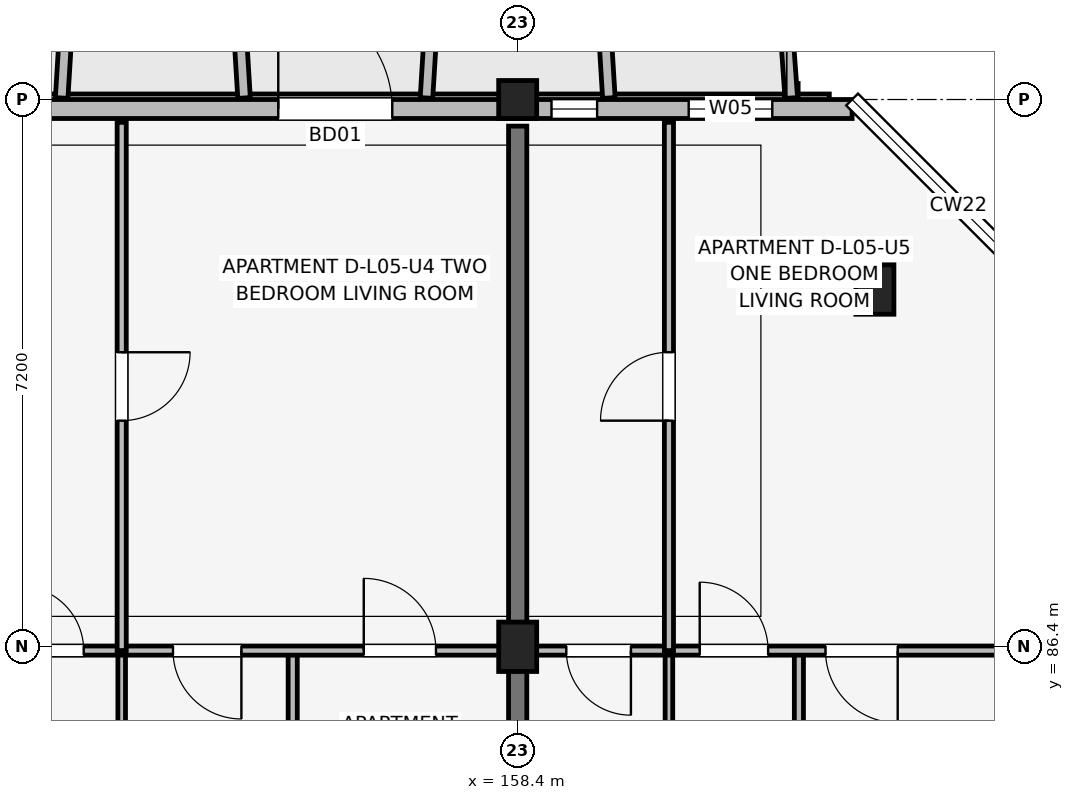
"""IFC4 building model, lengths in metres.
Left out: names, types, materials, properties, quantities, classifications, styles, units other than length and angle.
Written with IfcOpenShell. Run it as: python <this file> out.ifc"""

import sys

from ifc_helpers import new_model, si_unit, direction, frame, frame_2d, origin, origin_2d, place, context, subcontext, project, spatial, rectangle, extrude, element, fill, save


model = new_model("IFC4")
c1 = context("Model", 3, precision=1e-05, world=origin(), true_north=direction((0.0, 1.0)))
c2 = subcontext(c1, "Body", "Model", "MODEL_VIEW")
j1 = project(units=[si_unit("LENGTHUNIT", "METRE"), si_unit("PLANEANGLEUNIT", "RADIAN")], contexts=[c1])
p1 = place(None, origin())
s1 = spatial("IfcSite", under=j1, at=p1, CompositionType="ELEMENT")
p2 = place(p1, origin())
s2 = spatial("IfcBuilding", under=s1, at=p2, CompositionType="ELEMENT")
p3 = place(p2, frame((0.0, 0.0, 18.15)))
s3 = spatial("IfcBuildingStorey", under=s2, at=p3, CompositionType="ELEMENT", Elevation=18.15)
p4 = place(p3, frame((158.4, 86.4, 0.0), z_axis=(0.0, 0.0, 1.0), x_axis=(1.0, 0.0, 0.0)))
e1 = element("IfcColumn", 1, at=p4, inside=s3, PredefinedType="COLUMN", context=c2, shape_type="SweptSolid", body=[
    extrude(rectangle(XDim=0.5, YDim=0.65, at=origin_2d()), origin(), (0.0, 0.0, 1.0), 3.15),
])
p5 = place(p3, frame((158.4, 93.6, 0.0), z_axis=(0.0, 0.0, 1.0), x_axis=(1.0, 0.0, 0.0)))
e2 = element("IfcColumn", 2, at=p5, inside=s3, PredefinedType="COLUMN", context=c2, shape_type="SweptSolid", body=[
    extrude(rectangle(XDim=0.5, YDim=0.5, at=origin_2d()), origin(), (0.0, 0.0, 1.0), 3.15),
])
p6 = place(p3, frame((163.1, 91.1, 0.0), z_axis=(0.0, 0.0, 1.0), x_axis=(1.0, 0.0, 0.0)))
e3 = element("IfcColumn", 3, at=p6, inside=s3, PredefinedType="COLUMN", context=c2, shape_type="SweptSolid", body=[
    extrude(rectangle(XDim=0.5, YDim=0.65, at=origin_2d()), origin(), (0.0, 0.0, 1.0), 3.15),
])
p7 = place(p3, frame((158.4, 83.85, 0.0), z_axis=(0.0, 0.0, 1.0), x_axis=(0.0, 1.0, 0.0)))
e4 = element("IfcWall", 4, at=p7, inside=s3, PredefinedType="SHEAR", context=c2, shape_type="SweptSolid", body=[
    extrude(rectangle(XDim=9.4, YDim=0.24, at=frame_2d((4.7, 0.0))), origin(), (0.0, 0.0, 1.0), 3.15),
])
p8 = place(p3, frame((162.8, 93.475, 0.0), z_axis=(0.0, 0.0, 1.0), x_axis=(-1.0, 0.0, 0.0)))
e5 = element("IfcWall", 5, at=p8, inside=s3, PredefinedType="SOLIDWALL", context=c2, shape_type="SweptSolid", body=[
    extrude(rectangle(XDim=30.4, YDim=0.25, at=frame_2d((15.2, 0.0))), origin(), (0.0, 0.0, 1.0), 2.43),
])
p9 = place(p8, frame((22.025, 0.0, 0.0), z_axis=(0.0, 0.0, 1.0), x_axis=(-1.0, 0.0, 0.0)))
e6 = element("IfcOpeningElement", 6, at=p9, cuts=e5, PredefinedType="OPENING", context=c2, shape_type="SweptSolid", body=[
    extrude(rectangle(XDim=1.65, YDim=2.15, at=frame_2d((0.825, 1.075))), frame((0.0, 0.135, 0.0), z_axis=(0.0, -1.0, 0.0), x_axis=(1.0, 0.0, 0.0)), (0.0, 0.0, 1.0), 0.27),
])
p10 = place(p8, frame((7.55, 0.0, 0.0), z_axis=(0.0, 0.0, 1.0), x_axis=(-1.0, 0.0, 0.0)))
e7 = element("IfcOpeningElement", 7, at=p10, cuts=e5, PredefinedType="OPENING", context=c2, shape_type="SweptSolid", body=[
    extrude(rectangle(XDim=1.5, YDim=2.15, at=frame_2d((0.75, 1.075))), frame((0.0, 0.135, 0.0), z_axis=(0.0, -1.0, 0.0), x_axis=(1.0, 0.0, 0.0)), (0.0, 0.0, 1.0), 0.27),
])
p11 = place(p8, frame((28.015, 0.0, 0.75)))
e8 = element("IfcOpeningElement", 8, at=p11, cuts=e5, PredefinedType="OPENING", context=c2, shape_type="SweptSolid", body=[
    extrude(rectangle(XDim=0.6, YDim=1.25, at=frame_2d((0.3, 0.625))), frame((0.0, 0.135, 0.0), z_axis=(0.0, -1.0, 0.0), x_axis=(1.0, 0.0, 0.0)), (0.0, 0.0, 1.0), 0.27),
])
p12 = place(p8, frame((15.47, 0.0, 0.7)))
e9 = element("IfcOpeningElement", 9, at=p12, cuts=e5, PredefinedType="OPENING", context=c2, shape_type="SweptSolid", body=[
    extrude(rectangle(XDim=1.86, YDim=1.6, at=frame_2d((0.93, 0.8))), frame((0.0, 0.135, 0.0), z_axis=(0.0, -1.0, 0.0), x_axis=(1.0, 0.0, 0.0)), (0.0, 0.0, 1.0), 0.27),
])
p13 = place(p8, frame((10.555, 0.0, 0.75)))
e10 = element("IfcOpeningElement", 10, at=p13, cuts=e5, PredefinedType="OPENING", context=c2, shape_type="SweptSolid", body=[
    extrude(rectangle(XDim=0.6, YDim=1.25, at=frame_2d((0.3, 0.625))), frame((0.0, 0.135, 0.0), z_axis=(0.0, -1.0, 0.0), x_axis=(1.0, 0.0, 0.0)), (0.0, 0.0, 1.0), 0.27),
])
p14 = place(p8, frame((3.355, 0.0, 0.75)))
e11 = element("IfcOpeningElement", 11, at=p14, cuts=e5, PredefinedType="OPENING", context=c2, shape_type="SweptSolid", body=[
    extrude(rectangle(XDim=0.6, YDim=1.25, at=frame_2d((0.3, 0.625))), frame((0.0, 0.135, 0.0), z_axis=(0.0, -1.0, 0.0), x_axis=(1.0, 0.0, 0.0)), (0.0, 0.0, 1.0), 0.27),
])
p15 = place(p8, frame((1.05, 0.0, 0.75)))
e12 = element("IfcOpeningElement", 12, at=p15, cuts=e5, PredefinedType="OPENING", context=c2, shape_type="SweptSolid", body=[
    extrude(rectangle(XDim=1.1, YDim=1.5, at=frame_2d((0.55, 0.75))), frame((0.0, 0.135, 0.0), z_axis=(0.0, -1.0, 0.0), x_axis=(1.0, 0.0, 0.0)), (0.0, 0.0, 1.0), 0.27),
])
for number, where, z_axis, x_axis in (
    (13, (152.4, 93.62, 0.0), (0.0, 0.0, 1.0), (0.061, 0.998, 0.0)),
    (14, (154.8, 93.62, 0.0), (0.0, 0.0, 1.0), (-0.061, 0.998, 0.0)),
    (15, (157.2, 93.62, 0.0), (0.0, 0.0, 1.0), (0.061, 0.998, 0.0)),
):
    element("IfcWall", number, at=place(p3, frame(where, z_axis=z_axis, x_axis=x_axis)), inside=s3, PredefinedType="ELEMENTEDWALL", context=c2, shape_type="SweptSolid", body=[
        extrude(rectangle(XDim=1.964, YDim=0.165, at=frame_2d((0.982, 0.0))), origin(), (0.0, 0.0, 1.0), 2.53),
    ])
p16 = place(p3, frame((159.6, 93.62, 0.0), z_axis=(0.0, 0.0, 1.0), x_axis=(-0.061170732449, 0.998127317276, 0.0)))
e16 = element("IfcWall", 16, at=p16, inside=s3, PredefinedType="ELEMENTEDWALL", context=c2, shape_type="SweptSolid", body=[
    extrude(rectangle(XDim=1.964, YDim=0.165, at=frame_2d((0.982, 0.0))), origin(), (0.0, 0.0, 1.0), 2.95),
])
p17 = place(p3, frame((162.0, 93.62, 0.0), z_axis=(0.0, 0.0, 1.0), x_axis=(-0.071194071069, 0.997462482625, 0.0)))
e17 = element("IfcWall", 17, at=p17, inside=s3, PredefinedType="ELEMENTEDWALL", context=c2, shape_type="SweptSolid", body=[
    extrude(rectangle(XDim=1.965, YDim=0.165, at=frame_2d((0.982, 0.0))), origin(), (0.0, 0.0, 1.0), 2.95),
])
p18 = place(p3, frame((153.19, 83.7, 0.0), z_axis=(0.0, 0.0, 1.0), x_axis=(0.0, 1.0, 0.0)))
e18 = element("IfcWall", 18, at=p18, inside=s3, PredefinedType="PARTITIONING", context=c2, shape_type="SweptSolid", body=[
    extrude(rectangle(XDim=2.65, YDim=0.1, at=frame_2d((1.325, 0.0))), origin(), (0.0, 0.0, 1.0), 2.375),
])
p19 = place(p3, frame((155.44, 83.7, 0.0), z_axis=(0.0, 0.0, 1.0), x_axis=(0.0, 1.0, 0.0)))
e19 = element("IfcWall", 19, at=p19, inside=s3, PredefinedType="PARTITIONING", context=c2, shape_type="SweptSolid", body=[
    extrude(rectangle(XDim=2.65, YDim=0.12, at=frame_2d((1.325, 0.0))), origin(), (0.0, 0.0, 1.0), 2.375),
])
p20 = place(p3, frame((151.34, 86.35, 0.0), z_axis=(0.0, 0.0, 1.0), x_axis=(1.0, 0.0, 0.0)))
e20 = element("IfcWall", 20, at=p20, inside=s3, PredefinedType="PARTITIONING", context=c2, shape_type="SweptSolid", body=[
    extrude(rectangle(XDim=6.92, YDim=0.12, at=frame_2d((3.46, 0.0))), origin(), (0.0, 0.0, 1.0), 2.375),
])
p21 = place(p20, frame((0.5, 0.0, 0.0)))
e21 = element("IfcOpeningElement", 21, at=p21, cuts=e20, PredefinedType="OPENING", context=c2, shape_type="SweptSolid", body=[
    extrude(rectangle(XDim=0.85, YDim=2.08, at=frame_2d((0.425, 1.04))), frame((0.0, 0.07, 0.0), z_axis=(0.0, -1.0, 0.0), x_axis=(1.0, 0.0, 0.0)), (0.0, 0.0, 1.0), 0.14),
])
p22 = place(p20, frame((3.425, 0.0, 0.0), z_axis=(0.0, 0.0, 1.0), x_axis=(-1.0, 0.0, 0.0)))
e22 = element("IfcOpeningElement", 22, at=p22, cuts=e20, PredefinedType="OPENING", context=c2, shape_type="SweptSolid", body=[
    extrude(rectangle(XDim=0.9, YDim=2.08, at=frame_2d((0.45, 1.04))), frame((0.0, 0.07, 0.0), z_axis=(0.0, -1.0, 0.0), x_axis=(1.0, 0.0, 0.0)), (0.0, 0.0, 1.0), 0.14),
])
p23 = place(p20, frame((5.035, 0.0, 0.0)))
e23 = element("IfcOpeningElement", 23, at=p23, cuts=e20, PredefinedType="OPENING", context=c2, shape_type="SweptSolid", body=[
    extrude(rectangle(XDim=0.95, YDim=2.08, at=frame_2d((0.475, 1.04))), frame((0.0, 0.07, 0.0), z_axis=(0.0, -1.0, 0.0), x_axis=(1.0, 0.0, 0.0)), (0.0, 0.0, 1.0), 0.14),
])
p24 = place(p3, frame((153.19, 86.35, 0.0), z_axis=(0.0, 0.0, 1.0), x_axis=(0.0, 1.0, 0.0)))
e24 = element("IfcWall", 24, at=p24, inside=s3, PredefinedType="PARTITIONING", context=c2, shape_type="SweptSolid", body=[
    extrude(rectangle(XDim=6.95, YDim=0.12, at=frame_2d((3.475, 0.0))), origin(), (0.0, 0.0, 1.0), 2.375),
])
p25 = place(p24, frame((3.925, 0.0, 0.0), z_axis=(0.0, 0.0, 1.0), x_axis=(-1.0, 0.0, 0.0)))
e25 = element("IfcOpeningElement", 25, at=p25, cuts=e24, PredefinedType="OPENING", context=c2, shape_type="SweptSolid", body=[
    extrude(rectangle(XDim=0.9, YDim=2.08, at=frame_2d((0.45, 1.04))), frame((0.0, 0.07, 0.0), z_axis=(0.0, -1.0, 0.0), x_axis=(1.0, 0.0, 0.0)), (0.0, 0.0, 1.0), 0.14),
])
p26 = place(p3, frame((160.39, 83.7, 0.0), z_axis=(0.0, 0.0, 1.0), x_axis=(0.0, 1.0, 0.0)))
e26 = element("IfcWall", 26, at=p26, inside=s3, PredefinedType="PARTITIONING", context=c2, shape_type="SweptSolid", body=[
    extrude(rectangle(XDim=2.65, YDim=0.1, at=frame_2d((1.325, 0.0))), origin(), (0.0, 0.0, 1.0), 2.375),
])
p27 = place(p3, frame((162.1, 83.7, 0.0), z_axis=(0.0, 0.0, 1.0), x_axis=(0.0, 1.0, 0.0)))
e27 = element("IfcWall", 27, at=p27, inside=s3, PredefinedType="PARTITIONING", context=c2, shape_type="SweptSolid", body=[
    extrude(rectangle(XDim=2.65, YDim=0.12, at=frame_2d((1.325, 0.0))), origin(), (0.0, 0.0, 1.0), 2.375),
])
p28 = place(p3, frame((158.54, 86.35, 0.0), z_axis=(0.0, 0.0, 1.0), x_axis=(1.0, 0.0, 0.0)))
e28 = element("IfcWall", 28, at=p28, inside=s3, PredefinedType="PARTITIONING", context=c2, shape_type="SweptSolid", body=[
    extrude(rectangle(XDim=6.92, YDim=0.12, at=frame_2d((3.46, 0.0))), origin(), (0.0, 0.0, 1.0), 2.375),
])
p29 = place(p28, frame((1.35, 0.0, 0.0), z_axis=(0.0, 0.0, 1.0), x_axis=(-1.0, 0.0, 0.0)))
e29 = element("IfcOpeningElement", 29, at=p29, cuts=e28, PredefinedType="OPENING", context=c2, shape_type="SweptSolid", body=[
    extrude(rectangle(XDim=0.85, YDim=2.08, at=frame_2d((0.425, 1.04))), frame((0.0, 0.07, 0.0), z_axis=(0.0, -1.0, 0.0), x_axis=(1.0, 0.0, 0.0)), (0.0, 0.0, 1.0), 0.14),
])
p30 = place(p28, frame((2.255, 0.0, 0.0)))
e30 = element("IfcOpeningElement", 30, at=p30, cuts=e28, PredefinedType="OPENING", context=c2, shape_type="SweptSolid", body=[
    extrude(rectangle(XDim=0.9, YDim=2.08, at=frame_2d((0.45, 1.04))), frame((0.0, 0.07, 0.0), z_axis=(0.0, -1.0, 0.0), x_axis=(1.0, 0.0, 0.0)), (0.0, 0.0, 1.0), 0.14),
])
p31 = place(p28, frame((4.86, 0.0, 0.0), z_axis=(0.0, 0.0, 1.0), x_axis=(-1.0, 0.0, 0.0)))
e31 = element("IfcOpeningElement", 31, at=p31, cuts=e28, PredefinedType="OPENING", context=c2, shape_type="SweptSolid", body=[
    extrude(rectangle(XDim=0.95, YDim=2.08, at=frame_2d((0.475, 1.04))), frame((0.0, 0.07, 0.0), z_axis=(0.0, -1.0, 0.0), x_axis=(1.0, 0.0, 0.0)), (0.0, 0.0, 1.0), 0.14),
])
p32 = place(p3, frame((160.39, 86.35, 0.0), z_axis=(0.0, 0.0, 1.0), x_axis=(0.0, 1.0, 0.0)))
e32 = element("IfcWall", 32, at=p32, inside=s3, PredefinedType="PARTITIONING", context=c2, shape_type="SweptSolid", body=[
    extrude(rectangle(XDim=6.95, YDim=0.12, at=frame_2d((3.475, 0.0))), origin(), (0.0, 0.0, 1.0), 2.375),
])
p33 = place(p32, frame((3.025, 0.0, 0.0)))
e33 = element("IfcOpeningElement", 33, at=p33, cuts=e32, PredefinedType="OPENING", context=c2, shape_type="SweptSolid", body=[
    extrude(rectangle(XDim=0.9, YDim=2.08, at=frame_2d((0.45, 1.04))), frame((0.0, 0.07, 0.0), z_axis=(0.0, -1.0, 0.0), x_axis=(1.0, 0.0, 0.0)), (0.0, 0.0, 1.0), 0.14),
])
p34 = place(p10, origin())
e34 = element("IfcDoor", 34, at=p34, inside=s3, OperationType="SINGLE_SWING_RIGHT", PredefinedType="DOOR", context=c2, shape_type="SweptSolid", body=[
    extrude(rectangle(XDim=1.5, YDim=2.15, at=frame_2d((0.75, 1.075))), frame((0.0, 0.025, 0.0), z_axis=(0.0, -1.0, 0.0), x_axis=(1.0, 0.0, 0.0)), (0.0, 0.0, 1.0), 0.05),
])
fill(e7, e34)
p35 = place(p14, origin())
e35 = element("IfcWindow", 35, at=p35, inside=s3, PartitioningType="SINGLE_PANEL", PredefinedType="WINDOW", context=c2, shape_type="SweptSolid", body=[
    extrude(rectangle(XDim=0.6, YDim=1.25, at=frame_2d((0.3, 0.625))), frame((0.0, 0.03, 0.0), z_axis=(0.0, -1.0, 0.0), x_axis=(1.0, 0.0, 0.0)), (0.0, 0.0, 1.0), 0.06),
])
fill(e11, e35)
p36 = place(p15, origin())
e36 = element("IfcWindow", 36, at=p36, inside=s3, PartitioningType="SINGLE_PANEL", PredefinedType="WINDOW", context=c2, shape_type="SweptSolid", body=[
    extrude(rectangle(XDim=1.1, YDim=1.5, at=frame_2d((0.55, 0.75))), frame((0.0, 0.03, 0.0), z_axis=(0.0, -1.0, 0.0), x_axis=(1.0, 0.0, 0.0)), (0.0, 0.0, 1.0), 0.06),
])
fill(e12, e36)
p37 = place(p21, origin())
e37 = element("IfcDoor", 37, at=p37, inside=s3, OperationType="SINGLE_SWING_LEFT", PredefinedType="DOOR", context=c2, shape_type="SweptSolid", body=[
    extrude(rectangle(XDim=0.85, YDim=2.08, at=frame_2d((0.425, 1.04))), frame((0.0, 0.025, 0.0), z_axis=(0.0, -1.0, 0.0), x_axis=(1.0, 0.0, 0.0)), (0.0, 0.0, 1.0), 0.05),
])
fill(e21, e37)
p38 = place(p22, origin())
e38 = element("IfcDoor", 38, at=p38, inside=s3, OperationType="SINGLE_SWING_RIGHT", PredefinedType="DOOR", context=c2, shape_type="SweptSolid", body=[
    extrude(rectangle(XDim=0.9, YDim=2.08, at=frame_2d((0.45, 1.04))), frame((0.0, 0.025, 0.0), z_axis=(0.0, -1.0, 0.0), x_axis=(1.0, 0.0, 0.0)), (0.0, 0.0, 1.0), 0.05),
])
fill(e22, e38)
p39 = place(p23, origin())
e39 = element("IfcDoor", 39, at=p39, inside=s3, OperationType="SINGLE_SWING_LEFT", PredefinedType="DOOR", context=c2, shape_type="SweptSolid", body=[
    extrude(rectangle(XDim=0.95, YDim=2.08, at=frame_2d((0.475, 1.04))), frame((0.0, 0.025, 0.0), z_axis=(0.0, -1.0, 0.0), x_axis=(1.0, 0.0, 0.0)), (0.0, 0.0, 1.0), 0.05),
])
fill(e23, e39)
p40 = place(p25, origin())
e40 = element("IfcDoor", 40, at=p40, inside=s3, OperationType="SINGLE_SWING_RIGHT", PredefinedType="DOOR", context=c2, shape_type="SweptSolid", body=[
    extrude(rectangle(XDim=0.9, YDim=2.08, at=frame_2d((0.45, 1.04))), frame((0.0, 0.025, 0.0), z_axis=(0.0, -1.0, 0.0), x_axis=(1.0, 0.0, 0.0)), (0.0, 0.0, 1.0), 0.05),
])
fill(e25, e40)
p41 = place(p29, origin())
e41 = element("IfcDoor", 41, at=p41, inside=s3, OperationType="SINGLE_SWING_RIGHT", PredefinedType="DOOR", context=c2, shape_type="SweptSolid", body=[
    extrude(rectangle(XDim=0.85, YDim=2.08, at=frame_2d((0.425, 1.04))), frame((0.0, 0.025, 0.0), z_axis=(0.0, -1.0, 0.0), x_axis=(1.0, 0.0, 0.0)), (0.0, 0.0, 1.0), 0.05),
])
fill(e29, e41)
p42 = place(p30, origin())
e42 = element("IfcDoor", 42, at=p42, inside=s3, OperationType="SINGLE_SWING_LEFT", PredefinedType="DOOR", context=c2, shape_type="SweptSolid", body=[
    extrude(rectangle(XDim=0.9, YDim=2.08, at=frame_2d((0.45, 1.04))), frame((0.0, 0.025, 0.0), z_axis=(0.0, -1.0, 0.0), x_axis=(1.0, 0.0, 0.0)), (0.0, 0.0, 1.0), 0.05),
])
fill(e30, e42)
p43 = place(p31, origin())
e43 = element("IfcDoor", 43, at=p43, inside=s3, OperationType="SINGLE_SWING_RIGHT", PredefinedType="DOOR", context=c2, shape_type="SweptSolid", body=[
    extrude(rectangle(XDim=0.95, YDim=2.08, at=frame_2d((0.475, 1.04))), frame((0.0, 0.025, 0.0), z_axis=(0.0, -1.0, 0.0), x_axis=(1.0, 0.0, 0.0)), (0.0, 0.0, 1.0), 0.05),
])
fill(e31, e43)
p44 = place(p33, origin())
e44 = element("IfcDoor", 44, at=p44, inside=s3, OperationType="SINGLE_SWING_LEFT", PredefinedType="DOOR", context=c2, shape_type="SweptSolid", body=[
    extrude(rectangle(XDim=0.9, YDim=2.08, at=frame_2d((0.45, 1.04))), frame((0.0, 0.025, 0.0), z_axis=(0.0, -1.0, 0.0), x_axis=(1.0, 0.0, 0.0)), (0.0, 0.0, 1.0), 0.05),
])
fill(e33, e44)
save(model, sys.argv[1])
